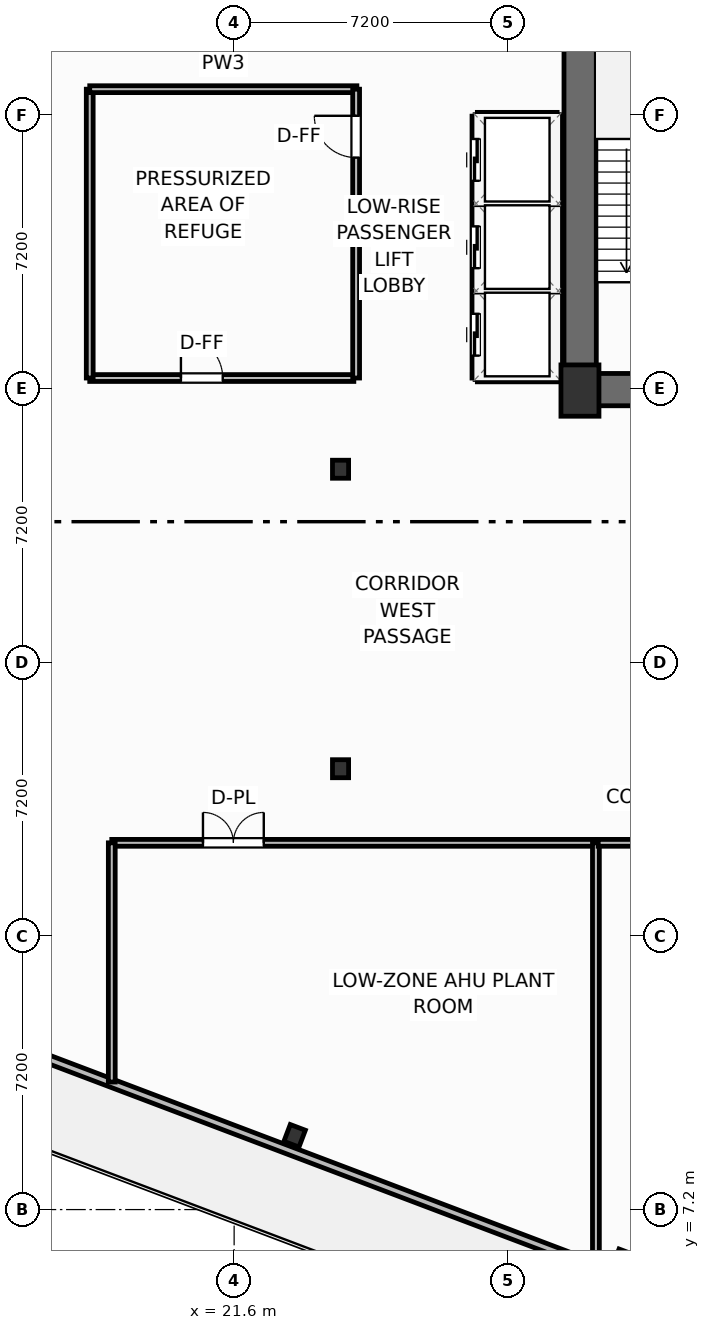
"""IFC4 building model, lengths in metres.
Left out: names, types, materials, properties, quantities, classifications, styles, units other than length and angle.
Written with IfcOpenShell. Run it as: python <this file> out.ifc"""

import sys

from ifc_helpers import new_model, si_unit, direction, frame, frame_2d, origin, origin_2d, place, context, subcontext, project, spatial, rectangle, i_section, extrude, element, fill, save


model = new_model("IFC4")
c1 = context("Model", 3, precision=1e-05, world=origin(), true_north=direction((0.0, 1.0)))
c2 = subcontext(c1, "Body", "Model", "MODEL_VIEW")
j1 = project(units=[si_unit("LENGTHUNIT", "METRE"), si_unit("PLANEANGLEUNIT", "RADIAN")], contexts=[c1])
p1 = place(None, origin())
s1 = spatial("IfcSite", under=j1, at=p1, CompositionType="ELEMENT")
p2 = place(p1, origin())
s2 = spatial("IfcBuilding", under=s1, at=p2, CompositionType="ELEMENT")
p3 = place(p2, frame((0.0, 0.0, 71.4)))
s3 = spatial("IfcBuildingStorey", under=s2, at=p3, CompositionType="ELEMENT", Elevation=71.4)
p4 = place(p3, frame((30.7, 28.75, 0.0), z_axis=(0.0, 0.0, 1.0), x_axis=(1.0, 0.0, 0.0)))
e1 = element("IfcColumn", 1, at=p4, inside=s3, PredefinedType="COLUMN", context=c2, shape_type="SweptSolid", body=[
    extrude(rectangle(XDim=1.0, YDim=1.35, at=origin_2d()), origin(), (0.0, 0.0, 1.0), 4.8),
])
for number, where, z_axis, x_axis in (
    (2, (24.4, 18.8, 0.0), (0.0, 0.0, 1.0), (1.0, 0.0, 0.0)),
    (3, (24.4, 26.68, 0.0), (0.0, 0.0, 1.0), (1.0, 0.0, 0.0)),
):
    element("IfcColumn", number, at=place(p3, frame(where, z_axis=z_axis, x_axis=x_axis)), inside=s3, PredefinedType="COLUMN", context=c2, shape_type="SweptSolid", body=[
        extrude(i_section(OverallWidth=0.424, OverallDepth=0.474, WebThickness=0.048, FlangeThickness=0.077, FilletRadius=0.025, at=origin_2d()), origin(), (0.0, 0.0, 1.0), 4.8),
    ])
p5 = place(p3, frame((30.705, 29.2, 0.0), z_axis=(0.0, 0.0, 1.0), x_axis=(0.0, 1.0, 0.0)))
e4 = element("IfcWall", 4, at=p5, inside=s3, PredefinedType="SHEAR", context=c2, shape_type="SweptSolid", body=[
    extrude(rectangle(XDim=9.22, YDim=0.85, at=frame_2d((4.61, 0.0))), origin(), (0.0, 0.0, 1.0), 4.55),
])
p6 = place(p3, frame((30.28, 28.775, 0.0), z_axis=(0.0, 0.0, 1.0), x_axis=(1.0, 0.0, 0.0)))
e5 = element("IfcWall", 5, at=p6, inside=s3, PredefinedType="SHEAR", context=c2, shape_type="SweptSolid", body=[
    extrude(rectangle(XDim=4.52, YDim=0.85, at=frame_2d((2.26, 0.0))), origin(), (0.0, 0.0, 1.0), 4.55),
])
for number, where, z_axis, x_axis in (
    (6, (23.192, 9.141, -0.32), (0.0, 0.0, 1.0), (0.935, -0.354, 0.0)),
    (7, (31.843, 5.866, -0.32), (0.0, 0.0, 1.0), (0.935, -0.354, 0.0)),
):
    element("IfcColumn", number, at=place(p3, frame(where, z_axis=z_axis, x_axis=x_axis)), inside=s3, PredefinedType="COLUMN", context=c2, shape_type="SweptSolid", body=[
        extrude(i_section(OverallWidth=0.424, OverallDepth=0.474, WebThickness=0.048, FlangeThickness=0.077, FilletRadius=0.025, at=origin_2d()), origin(), (0.0, 0.0, 1.0), 5.12),
    ])
p7 = place(p3, frame((59.754, -5.139, 0.0), z_axis=(0.0, 0.0, 1.0), x_axis=(-0.935222250741, 0.354061211825, 0.0)))
e8 = element("IfcWall", 8, at=p7, inside=s3, PredefinedType="SOLIDWALL", context=c2, shape_type="SweptSolid", body=[
    extrude(rectangle(XDim=60.0, YDim=0.22, at=frame_2d((30.0, 0.0))), origin(), (0.0, 0.0, 1.0), 3.83),
])
p8 = place(p7, frame((27.647, 0.0, 0.0)))
e9 = element("IfcOpeningElement", 9, at=p8, cuts=e8, PredefinedType="OPENING", context=c2, shape_type="SweptSolid", body=[
    extrude(rectangle(XDim=1.85, YDim=2.3, at=frame_2d((0.925, 1.15))), frame((0.0, 0.12, 0.0), z_axis=(0.0, -1.0, 0.0), x_axis=(1.0, 0.0, 0.0)), (0.0, 0.0, 1.0), 0.24),
])
p9 = place(p7, frame((0.55, 0.0, 0.75)))
e10 = element("IfcOpeningElement", 10, at=p9, cuts=e8, PredefinedType="OPENING", context=c2, shape_type="SweptSolid", body=[
    extrude(rectangle(XDim=1.65, YDim=1.65, at=frame_2d((0.825, 0.825))), frame((0.0, 0.12, 0.0), z_axis=(0.0, -1.0, 0.0), x_axis=(1.0, 0.0, 0.0)), (0.0, 0.0, 1.0), 0.24),
])
p10 = place(p7, frame((57.8, 0.0, 0.75)))
e11 = element("IfcOpeningElement", 11, at=p10, cuts=e8, PredefinedType="OPENING", context=c2, shape_type="SweptSolid", body=[
    extrude(rectangle(XDim=1.65, YDim=1.65, at=frame_2d((0.825, 0.825))), frame((0.0, 0.12, 0.0), z_axis=(0.0, -1.0, 0.0), x_axis=(1.0, 0.0, 0.0)), (0.0, 0.0, 1.0), 0.24),
])
p11 = place(p3, frame((18.646, 55.739, 0.0), z_axis=(0.0, 0.0, 1.0), x_axis=(0.935222250741, -0.354061211825, 0.0)))
e12 = element("IfcWall", 12, at=p11, inside=s3, PredefinedType="SOLIDWALL", context=c2, shape_type="SweptSolid", body=[
    extrude(rectangle(XDim=60.0, YDim=0.22, at=frame_2d((30.0, 0.0))), origin(), (0.0, 0.0, 1.0), 3.83),
])
p12 = place(p11, frame((27.647, 0.0, 0.0)))
e13 = element("IfcOpeningElement", 13, at=p12, cuts=e12, PredefinedType="OPENING", context=c2, shape_type="SweptSolid", body=[
    extrude(rectangle(XDim=1.85, YDim=2.3, at=frame_2d((0.925, 1.15))), frame((0.0, 0.12, 0.0), z_axis=(0.0, -1.0, 0.0), x_axis=(1.0, 0.0, 0.0)), (0.0, 0.0, 1.0), 0.24),
])
p13 = place(p11, frame((0.55, 0.0, 0.75)))
e14 = element("IfcOpeningElement", 14, at=p13, cuts=e12, PredefinedType="OPENING", context=c2, shape_type="SweptSolid", body=[
    extrude(rectangle(XDim=1.65, YDim=1.65, at=frame_2d((0.825, 0.825))), frame((0.0, 0.12, 0.0), z_axis=(0.0, -1.0, 0.0), x_axis=(1.0, 0.0, 0.0)), (0.0, 0.0, 1.0), 0.24),
])
p14 = place(p11, frame((57.8, 0.0, 0.75)))
e15 = element("IfcOpeningElement", 15, at=p14, cuts=e12, PredefinedType="OPENING", context=c2, shape_type="SweptSolid", body=[
    extrude(rectangle(XDim=1.65, YDim=1.65, at=frame_2d((0.825, 0.825))), frame((0.0, 0.12, 0.0), z_axis=(0.0, -1.0, 0.0), x_axis=(1.0, 0.0, 0.0)), (0.0, 0.0, 1.0), 0.24),
])
p15 = place(p3, frame((17.8, 29.08, 0.0), z_axis=(0.0, 0.0, 1.0), x_axis=(1.0, 0.0, 0.0)))
e16 = element("IfcWall", 16, at=p15, inside=s3, PredefinedType="PARTITIONING", context=c2, shape_type="SweptSolid", body=[
    extrude(rectangle(XDim=6.95, YDim=0.18, at=frame_2d((3.475, 0.0))), origin(), (0.0, 0.0, 1.0), 4.55),
])
p16 = place(p15, frame((2.4, 0.0, 0.0)))
e17 = element("IfcOpeningElement", 17, at=p16, cuts=e16, PredefinedType="OPENING", context=c2, shape_type="SweptSolid", body=[
    extrude(rectangle(XDim=1.1, YDim=2.15, at=frame_2d((0.55, 1.075))), frame((0.0, 0.1, 0.0), z_axis=(0.0, -1.0, 0.0), x_axis=(1.0, 0.0, 0.0)), (0.0, 0.0, 1.0), 0.2),
])
p17 = place(p3, frame((17.8, 29.08, 0.0), z_axis=(0.0, 0.0, 1.0), x_axis=(0.0, 1.0, 0.0)))
e18 = element("IfcWall", 18, at=p17, inside=s3, PredefinedType="PARTITIONING", context=c2, shape_type="SweptSolid", body=[
    extrude(rectangle(XDim=7.6, YDim=0.18, at=frame_2d((3.8, 0.0))), origin(), (0.0, 0.0, 1.0), 4.55),
])
p18 = place(p3, frame((17.8, 36.68, 0.0), z_axis=(0.0, 0.0, 1.0), x_axis=(1.0, 0.0, 0.0)))
e19 = element("IfcWall", 19, at=p18, inside=s3, PredefinedType="PARTITIONING", context=c2, shape_type="SweptSolid", body=[
    extrude(rectangle(XDim=7.03, YDim=0.18, at=frame_2d((3.515, 0.0))), origin(), (0.0, 0.0, 1.0), 4.55),
])
p19 = place(p3, frame((24.81, 29.08, 0.0), z_axis=(0.0, 0.0, 1.0), x_axis=(0.0, 1.0, 0.0)))
e20 = element("IfcWall", 20, at=p19, inside=s3, PredefinedType="PARTITIONING", context=c2, shape_type="SweptSolid", body=[
    extrude(rectangle(XDim=7.6, YDim=0.18, at=frame_2d((3.8, 0.0))), origin(), (0.0, 0.0, 1.0), 4.55),
])
p20 = place(p19, frame((5.8, 0.0, 0.0)))
e21 = element("IfcOpeningElement", 21, at=p20, cuts=e20, PredefinedType="OPENING", context=c2, shape_type="SweptSolid", body=[
    extrude(rectangle(XDim=1.1, YDim=2.15, at=frame_2d((0.55, 1.075))), frame((0.0, 0.1, 0.0), z_axis=(0.0, -1.0, 0.0), x_axis=(1.0, 0.0, 0.0)), (0.0, 0.0, 1.0), 0.2),
])
p21 = place(p3, frame((18.38, 16.85, 0.0), z_axis=(0.0, 0.0, 1.0), x_axis=(1.0, 0.0, 0.0)))
e22 = element("IfcWall", 22, at=p21, inside=s3, PredefinedType="PARTITIONING", context=c2, shape_type="SweptSolid", body=[
    extrude(rectangle(XDim=12.74, YDim=0.18, at=frame_2d((6.37, 0.0))), origin(), (0.0, 0.0, 1.0), 4.55),
])
p22 = place(p21, frame((2.4, 0.0, 0.0)))
e23 = element("IfcOpeningElement", 23, at=p22, cuts=e22, PredefinedType="OPENING", context=c2, shape_type="SweptSolid", body=[
    extrude(rectangle(XDim=1.6, YDim=2.05, at=frame_2d((0.8, 1.025))), frame((0.0, 0.1, 0.0), z_axis=(0.0, -1.0, 0.0), x_axis=(1.0, 0.0, 0.0)), (0.0, 0.0, 1.0), 0.2),
])
p23 = place(p3, frame((31.12, 5.733, 0.0), z_axis=(0.0, 0.0, 1.0), x_axis=(0.0, 1.0, 0.0)))
e24 = element("IfcWall", 24, at=p23, inside=s3, PredefinedType="PARTITIONING", context=c2, shape_type="SweptSolid", body=[
    extrude(rectangle(XDim=11.117, YDim=0.18, at=frame_2d((5.558, 0.0))), origin(), (0.0, 0.0, 1.0), 4.55),
])
p24 = place(p3, frame((18.38, 10.557, 0.0), z_axis=(0.0, 0.0, 1.0), x_axis=(0.0, 1.0, 0.0)))
e25 = element("IfcWall", 25, at=p24, inside=s3, PredefinedType="PARTITIONING", context=c2, shape_type="SweptSolid", body=[
    extrude(rectangle(XDim=6.293, YDim=0.18, at=frame_2d((3.147, 0.0))), origin(), (0.0, 0.0, 1.0), 4.55),
])
p25 = place(p3, frame((31.18, 16.85, 0.0), z_axis=(0.0, 0.0, 1.0), x_axis=(1.0, 0.0, 0.0)))
e26 = element("IfcWall", 26, at=p25, inside=s3, PredefinedType="PARTITIONING", context=c2, shape_type="SweptSolid", body=[
    extrude(rectangle(XDim=13.94, YDim=0.18, at=frame_2d((6.97, 0.0))), origin(), (0.0, 0.0, 1.0), 4.55),
])
p26 = place(p25, frame((6.2, 0.0, 0.0)))
e27 = element("IfcOpeningElement", 27, at=p26, cuts=e26, PredefinedType="OPENING", context=c2, shape_type="SweptSolid", body=[
    extrude(rectangle(XDim=1.6, YDim=2.05, at=frame_2d((0.8, 1.025))), frame((0.0, 0.1, 0.0), z_axis=(0.0, -1.0, 0.0), x_axis=(1.0, 0.0, 0.0)), (0.0, 0.0, 1.0), 0.2),
])
for number, where, z_axis, x_axis in (
    (28, (28.02, 31.375, 0.0), (0.0, 0.0, 1.0), (1.0, 0.0, 0.0)),
    (29, (28.02, 33.675, 0.0), (0.0, 0.0, 1.0), (1.0, 0.0, 0.0)),
):
    element("IfcWall", number, at=place(p3, frame(where, z_axis=z_axis, x_axis=x_axis)), inside=s3, PredefinedType="PARTITIONING", context=c2, shape_type="SweptSolid", body=[
        extrude(rectangle(XDim=2.06, YDim=0.2, at=frame_2d((1.03, 0.0))), origin(), (0.0, 0.0, 1.0), 4.55),
    ])
for number, where, z_axis, x_axis in (
    (30, (28.0, 29.08, 0.0), (0.0, 0.0, 1.0), (1.0, 0.0, 0.0)),
    (31, (28.0, 35.97, 0.0), (0.0, 0.0, 1.0), (1.0, 0.0, 0.0)),
):
    element("IfcWall", number, at=place(p3, frame(where, z_axis=z_axis, x_axis=x_axis)), inside=s3, PredefinedType="PARTITIONING", context=c2, shape_type="SweptSolid", body=[
        extrude(rectangle(XDim=2.1, YDim=0.2, at=frame_2d((1.05, 0.0))), origin(), (0.0, 0.0, 1.0), 4.55),
    ])
p27 = place(p3, frame((30.12, 29.08, 0.0), z_axis=(0.0, 0.0, 1.0), x_axis=(0.0, 1.0, 0.0)))
e32 = element("IfcWall", 32, at=p27, inside=s3, PredefinedType="PARTITIONING", context=c2, shape_type="SweptSolid", body=[
    extrude(rectangle(XDim=6.89, YDim=0.2, at=frame_2d((3.445, 0.0))), origin(), (0.0, 0.0, 1.0), 4.55),
])
p28 = place(p3, frame((27.96, 29.08, 0.0), z_axis=(0.0, 0.0, 1.0), x_axis=(0.0, 1.0, 0.0)))
e33 = element("IfcWall", 33, at=p28, inside=s3, PredefinedType="PARTITIONING", context=c2, shape_type="SweptSolid", body=[
    extrude(rectangle(XDim=6.89, YDim=0.2, at=frame_2d((3.445, 0.0))), origin(), (0.0, 0.0, 1.0), 4.55),
])
p29 = place(p28, frame((0.59, 0.0, 0.0)))
e34 = element("IfcOpeningElement", 34, at=p29, cuts=e33, PredefinedType="OPENING", context=c2, shape_type="SweptSolid", body=[
    extrude(rectangle(XDim=1.1, YDim=2.15, at=frame_2d((0.55, 1.075))), frame((0.0, 0.11, 0.0), z_axis=(0.0, -1.0, 0.0), x_axis=(1.0, 0.0, 0.0)), (0.0, 0.0, 1.0), 0.22),
])
p30 = place(p28, frame((2.89, 0.0, 0.0)))
e35 = element("IfcOpeningElement", 35, at=p30, cuts=e33, PredefinedType="OPENING", context=c2, shape_type="SweptSolid", body=[
    extrude(rectangle(XDim=1.1, YDim=2.15, at=frame_2d((0.55, 1.075))), frame((0.0, 0.11, 0.0), z_axis=(0.0, -1.0, 0.0), x_axis=(1.0, 0.0, 0.0)), (0.0, 0.0, 1.0), 0.22),
])
p31 = place(p28, frame((5.19, 0.0, 0.0)))
e36 = element("IfcOpeningElement", 36, at=p31, cuts=e33, PredefinedType="OPENING", context=c2, shape_type="SweptSolid", body=[
    extrude(rectangle(XDim=1.1, YDim=2.15, at=frame_2d((0.55, 1.075))), frame((0.0, 0.11, 0.0), z_axis=(0.0, -1.0, 0.0), x_axis=(1.0, 0.0, 0.0)), (0.0, 0.0, 1.0), 0.22),
])
p32 = place(p16, origin())
e37 = element("IfcDoor", 37, at=p32, inside=s3, OperationType="SINGLE_SWING_LEFT", PredefinedType="DOOR", context=c2, shape_type="SweptSolid", body=[
    extrude(rectangle(XDim=1.1, YDim=2.15, at=frame_2d((0.55, 1.075))), frame((0.0, 0.025, 0.0), z_axis=(0.0, -1.0, 0.0), x_axis=(1.0, 0.0, 0.0)), (0.0, 0.0, 1.0), 0.05),
])
fill(e17, e37)
p33 = place(p20, origin())
e38 = element("IfcDoor", 38, at=p33, inside=s3, OperationType="SINGLE_SWING_RIGHT", PredefinedType="DOOR", context=c2, shape_type="SweptSolid", body=[
    extrude(rectangle(XDim=1.1, YDim=2.15, at=frame_2d((0.55, 1.075))), frame((0.0, 0.025, 0.0), z_axis=(0.0, -1.0, 0.0), x_axis=(1.0, 0.0, 0.0)), (0.0, 0.0, 1.0), 0.05),
])
fill(e21, e38)
p34 = place(p22, origin())
e39 = element("IfcDoor", 39, at=p34, inside=s3, OperationType="DOUBLE_DOOR_SINGLE_SWING", PredefinedType="DOOR", context=c2, shape_type="SweptSolid", body=[
    extrude(rectangle(XDim=1.6, YDim=2.05, at=frame_2d((0.8, 1.025))), frame((0.0, 0.025, 0.0), z_axis=(0.0, -1.0, 0.0), x_axis=(1.0, 0.0, 0.0)), (0.0, 0.0, 1.0), 0.05),
])
fill(e23, e39)
p35 = place(p29, origin())
e40 = element("IfcDoor", 40, at=p35, inside=s3, OperationType="SLIDING_TO_LEFT", PredefinedType="DOOR", context=c2, shape_type="SweptSolid", body=[
    extrude(rectangle(XDim=1.1, YDim=2.15, at=frame_2d((0.55, 1.075))), frame((0.0, 0.025, 0.0), z_axis=(0.0, -1.0, 0.0), x_axis=(1.0, 0.0, 0.0)), (0.0, 0.0, 1.0), 0.05),
])
fill(e34, e40)
p36 = place(p30, origin())
e41 = element("IfcDoor", 41, at=p36, inside=s3, OperationType="SLIDING_TO_LEFT", PredefinedType="DOOR", context=c2, shape_type="SweptSolid", body=[
    extrude(rectangle(XDim=1.1, YDim=2.15, at=frame_2d((0.55, 1.075))), frame((0.0, 0.025, 0.0), z_axis=(0.0, -1.0, 0.0), x_axis=(1.0, 0.0, 0.0)), (0.0, 0.0, 1.0), 0.05),
])
fill(e35, e41)
p37 = place(p31, origin())
e42 = element("IfcDoor", 42, at=p37, inside=s3, OperationType="SLIDING_TO_LEFT", PredefinedType="DOOR", context=c2, shape_type="SweptSolid", body=[
    extrude(rectangle(XDim=1.1, YDim=2.15, at=frame_2d((0.55, 1.075))), frame((0.0, 0.025, 0.0), z_axis=(0.0, -1.0, 0.0), x_axis=(1.0, 0.0, 0.0)), (0.0, 0.0, 1.0), 0.05),
])
fill(e36, e42)
save(model, sys.argv[1])
